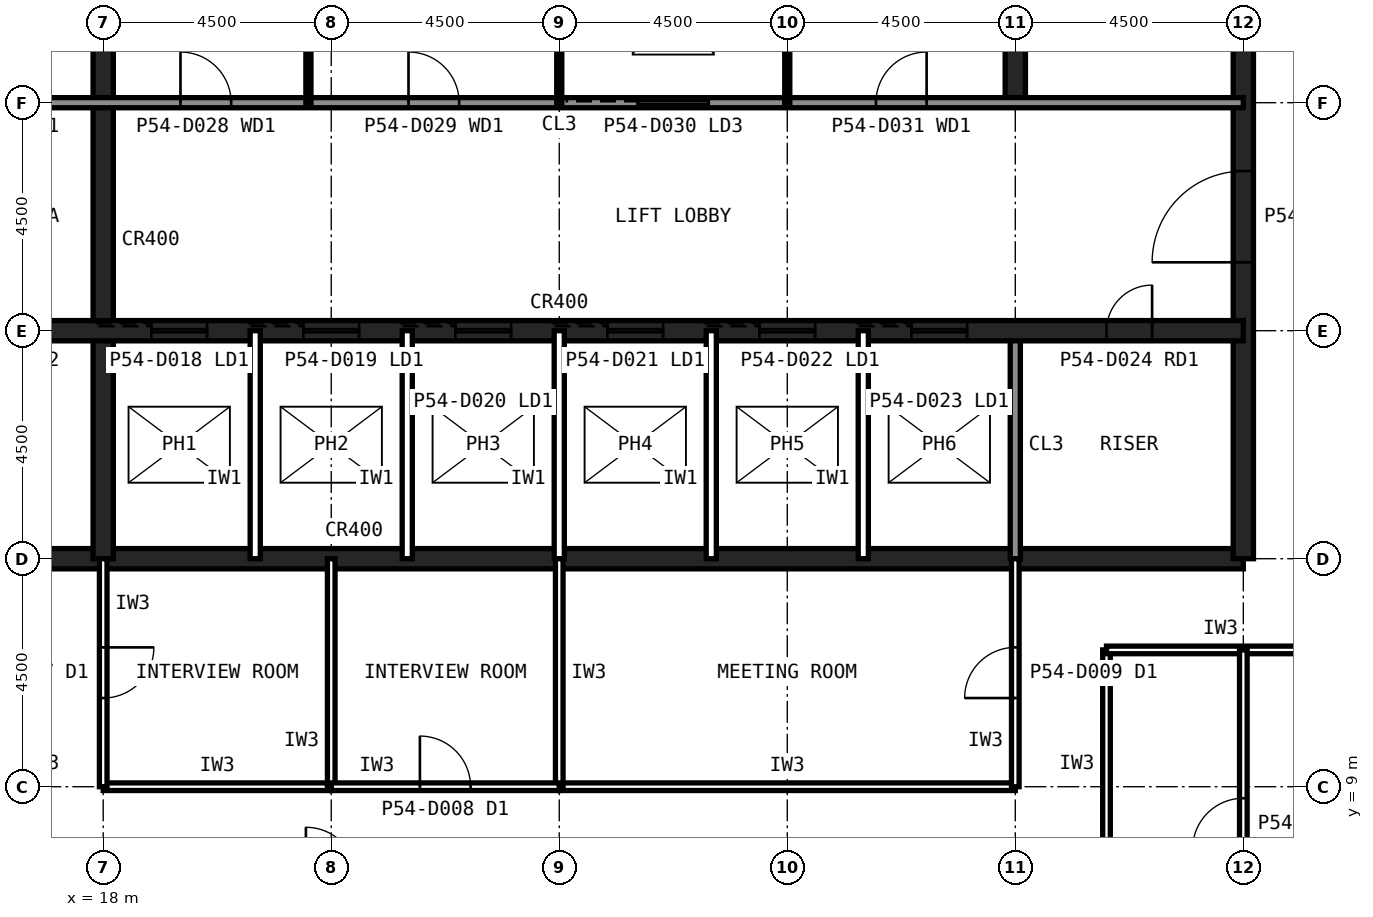
"""IFC4 building model, lengths in metres.
Left out: names, types, materials, properties, quantities, classifications, styles, units other than length and angle.
Written with IfcOpenShell. Run it as: python <this file> out.ifc"""

import sys

from ifc_helpers import new_model, si_unit, direction, frame, frame_2d, origin, place, context, subcontext, project, spatial, rectangle, extrude, element, fill, save


model = new_model("IFC4")
c1 = context("Model", 3, precision=1e-05, world=origin(), true_north=direction((0.0, 1.0)))
c2 = subcontext(c1, "Body", "Model", "MODEL_VIEW")
j1 = project(units=[si_unit("LENGTHUNIT", "METRE"), si_unit("PLANEANGLEUNIT", "RADIAN")], contexts=[c1])
p1 = place(None, origin())
s1 = spatial("IfcSite", under=j1, at=p1, CompositionType="ELEMENT")
p2 = place(p1, origin())
s2 = spatial("IfcBuilding", under=s1, at=p2, CompositionType="ELEMENT")
p3 = place(p2, frame((0.0, 0.0, 230.6)))
s3 = spatial("IfcBuildingStorey", under=s2, at=p3, CompositionType="ELEMENT", Elevation=230.6)
p4 = place(p3, frame((13.5, 13.5, 0.0), z_axis=(0.0, 0.0, 1.0), x_axis=(1.0, 0.0, 0.0)))
e1 = element("IfcWall", 1, at=p4, inside=s3, PredefinedType="SHEAR", context=c2, shape_type="SweptSolid", body=[
    extrude(rectangle(XDim=27.0, YDim=0.4, at=frame_2d((13.5, 0.0))), origin(), (0.0, 0.0, 1.0), 4.0),
])
p5 = place(p3, frame((40.5, 13.5, 0.0), z_axis=(0.0, 0.0, 1.0), x_axis=(0.0, 1.0, 0.0)))
e2 = element("IfcWall", 2, at=p5, inside=s3, PredefinedType="SHEAR", context=c2, shape_type="SweptSolid", body=[
    extrude(rectangle(XDim=27.0, YDim=0.4, at=frame_2d((13.5, 0.0))), origin(), (0.0, 0.0, 1.0), 4.0),
])
p6 = place(p5, frame((5.85, 0.0, 0.0)))
e3 = element("IfcOpeningElement", 3, at=p6, cuts=e2, PredefinedType="OPENING", context=c2, shape_type="SweptSolid", body=[
    extrude(rectangle(XDim=1.8, YDim=2.1, at=frame_2d((0.9, 1.05))), frame((0.0, 0.21, 0.0), z_axis=(0.0, -1.0, 0.0), x_axis=(1.0, 0.0, 0.0)), (0.0, 0.0, 1.0), 0.42),
])
p7 = place(p5, frame((19.65, 0.0, 0.0)))
e4 = element("IfcOpeningElement", 4, at=p7, cuts=e2, PredefinedType="OPENING", context=c2, shape_type="SweptSolid", body=[
    extrude(rectangle(XDim=1.2, YDim=2.1, at=frame_2d((0.6, 1.05))), frame((0.0, 0.21, 0.0), z_axis=(0.0, -1.0, 0.0), x_axis=(1.0, 0.0, 0.0)), (0.0, 0.0, 1.0), 0.42),
])
p8 = place(p3, frame((18.0, 13.5, 0.0), z_axis=(0.0, 0.0, 1.0), x_axis=(0.0, 1.0, 0.0)))
e5 = element("IfcWall", 5, at=p8, inside=s3, PredefinedType="SHEAR", context=c2, shape_type="SweptSolid", body=[
    extrude(rectangle(XDim=18.0, YDim=0.4, at=frame_2d((9.0, 0.0))), origin(), (0.0, 0.0, 1.0), 4.0),
])
p9 = place(p3, frame((36.0, 13.5, 0.0), z_axis=(0.0, 0.0, 1.0), x_axis=(0.0, 1.0, 0.0)))
e6 = element("IfcWall", 6, at=p9, inside=s3, PredefinedType="SOLIDWALL", context=c2, shape_type="SweptSolid", body=[
    extrude(rectangle(XDim=4.5, YDim=0.2, at=frame_2d((2.25, 0.0))), origin(), (0.0, 0.0, 1.0), 3.84),
])
p10 = place(p3, frame((36.0, 22.5, 0.0), z_axis=(0.0, 0.0, 1.0), x_axis=(0.0, 1.0, 0.0)))
e7 = element("IfcWall", 7, at=p10, inside=s3, PredefinedType="SHEAR", context=c2, shape_type="SweptSolid", body=[
    extrude(rectangle(XDim=18.0, YDim=0.4, at=frame_2d((9.0, 0.0))), origin(), (0.0, 0.0, 1.0), 4.0),
])
p11 = place(p3, frame((13.5, 18.0, 0.0), z_axis=(0.0, 0.0, 1.0), x_axis=(1.0, 0.0, 0.0)))
e8 = element("IfcWall", 8, at=p11, inside=s3, PredefinedType="SHEAR", context=c2, shape_type="SweptSolid", body=[
    extrude(rectangle(XDim=27.0, YDim=0.4, at=frame_2d((13.5, 0.0))), origin(), (0.0, 0.0, 1.0), 4.0),
])
p12 = place(p11, frame((24.3, 0.0, 0.0)))
e9 = element("IfcOpeningElement", 9, at=p12, cuts=e8, PredefinedType="OPENING", context=c2, shape_type="SweptSolid", body=[
    extrude(rectangle(XDim=0.9, YDim=2.1, at=frame_2d((0.45, 1.05))), frame((0.0, 0.21, 0.0), z_axis=(0.0, -1.0, 0.0), x_axis=(1.0, 0.0, 0.0)), (0.0, 0.0, 1.0), 0.42),
])
p13 = place(p11, frame((5.45, 0.0, 0.0)))
e10 = element("IfcOpeningElement", 10, at=p13, cuts=e8, PredefinedType="OPENING", context=c2, shape_type="SweptSolid", body=[
    extrude(rectangle(XDim=1.1, YDim=2.1, at=frame_2d((0.55, 1.05))), frame((0.0, 0.21, 0.0), z_axis=(0.0, -1.0, 0.0), x_axis=(1.0, 0.0, 0.0)), (0.0, 0.0, 1.0), 0.42),
])
p14 = place(p11, frame((8.45, 0.0, 0.0)))
e11 = element("IfcOpeningElement", 11, at=p14, cuts=e8, PredefinedType="OPENING", context=c2, shape_type="SweptSolid", body=[
    extrude(rectangle(XDim=1.1, YDim=2.1, at=frame_2d((0.55, 1.05))), frame((0.0, 0.21, 0.0), z_axis=(0.0, -1.0, 0.0), x_axis=(1.0, 0.0, 0.0)), (0.0, 0.0, 1.0), 0.42),
])
p15 = place(p11, frame((11.45, 0.0, 0.0)))
e12 = element("IfcOpeningElement", 12, at=p15, cuts=e8, PredefinedType="OPENING", context=c2, shape_type="SweptSolid", body=[
    extrude(rectangle(XDim=1.1, YDim=2.1, at=frame_2d((0.55, 1.05))), frame((0.0, 0.21, 0.0), z_axis=(0.0, -1.0, 0.0), x_axis=(1.0, 0.0, 0.0)), (0.0, 0.0, 1.0), 0.42),
])
p16 = place(p11, frame((14.45, 0.0, 0.0)))
e13 = element("IfcOpeningElement", 13, at=p16, cuts=e8, PredefinedType="OPENING", context=c2, shape_type="SweptSolid", body=[
    extrude(rectangle(XDim=1.1, YDim=2.1, at=frame_2d((0.55, 1.05))), frame((0.0, 0.21, 0.0), z_axis=(0.0, -1.0, 0.0), x_axis=(1.0, 0.0, 0.0)), (0.0, 0.0, 1.0), 0.42),
])
p17 = place(p11, frame((17.45, 0.0, 0.0)))
e14 = element("IfcOpeningElement", 14, at=p17, cuts=e8, PredefinedType="OPENING", context=c2, shape_type="SweptSolid", body=[
    extrude(rectangle(XDim=1.1, YDim=2.1, at=frame_2d((0.55, 1.05))), frame((0.0, 0.21, 0.0), z_axis=(0.0, -1.0, 0.0), x_axis=(1.0, 0.0, 0.0)), (0.0, 0.0, 1.0), 0.42),
])
p18 = place(p11, frame((20.45, 0.0, 0.0)))
e15 = element("IfcOpeningElement", 15, at=p18, cuts=e8, PredefinedType="OPENING", context=c2, shape_type="SweptSolid", body=[
    extrude(rectangle(XDim=1.1, YDim=2.1, at=frame_2d((0.55, 1.05))), frame((0.0, 0.21, 0.0), z_axis=(0.0, -1.0, 0.0), x_axis=(1.0, 0.0, 0.0)), (0.0, 0.0, 1.0), 0.42),
])
p19 = place(p11, frame((1.6, 0.0, 0.0)))
e16 = element("IfcOpeningElement", 16, at=p19, cuts=e8, PredefinedType="OPENING", context=c2, shape_type="SweptSolid", body=[
    extrude(rectangle(XDim=1.3, YDim=2.2, at=frame_2d((0.65, 1.1))), frame((0.0, 0.21, 0.0), z_axis=(0.0, -1.0, 0.0), x_axis=(1.0, 0.0, 0.0)), (0.0, 0.0, 1.0), 0.42),
])
p20 = place(p3, frame((13.5, 22.5, 0.0), z_axis=(0.0, 0.0, 1.0), x_axis=(1.0, 0.0, 0.0)))
e17 = element("IfcWall", 17, at=p20, inside=s3, PredefinedType="SOLIDWALL", context=c2, shape_type="SweptSolid", body=[
    extrude(rectangle(XDim=27.0, YDim=0.2, at=frame_2d((13.5, 0.0))), origin(), (0.0, 0.0, 1.0), 3.84),
])
p21 = place(p20, frame((1.65, 0.0, 0.0)))
e18 = element("IfcOpeningElement", 18, at=p21, cuts=e17, PredefinedType="OPENING", context=c2, shape_type="SweptSolid", body=[
    extrude(rectangle(XDim=1.2, YDim=2.1, at=frame_2d((0.6, 1.05))), frame((0.0, 0.11, 0.0), z_axis=(0.0, -1.0, 0.0), x_axis=(1.0, 0.0, 0.0)), (0.0, 0.0, 1.0), 0.22),
])
p22 = place(p20, frame((6.025, 0.0, 0.0)))
e19 = element("IfcOpeningElement", 19, at=p22, cuts=e17, PredefinedType="OPENING", context=c2, shape_type="SweptSolid", body=[
    extrude(rectangle(XDim=1.0, YDim=2.1, at=frame_2d((0.5, 1.05))), frame((0.0, 0.11, 0.0), z_axis=(0.0, -1.0, 0.0), x_axis=(1.0, 0.0, 0.0)), (0.0, 0.0, 1.0), 0.22),
])
p23 = place(p20, frame((10.525, 0.0, 0.0)))
e20 = element("IfcOpeningElement", 20, at=p23, cuts=e17, PredefinedType="OPENING", context=c2, shape_type="SweptSolid", body=[
    extrude(rectangle(XDim=1.0, YDim=2.1, at=frame_2d((0.5, 1.05))), frame((0.0, 0.11, 0.0), z_axis=(0.0, -1.0, 0.0), x_axis=(1.0, 0.0, 0.0)), (0.0, 0.0, 1.0), 0.22),
])
p24 = place(p20, frame((19.75, 0.0, 0.0)))
e21 = element("IfcOpeningElement", 21, at=p24, cuts=e17, PredefinedType="OPENING", context=c2, shape_type="SweptSolid", body=[
    extrude(rectangle(XDim=1.0, YDim=2.1, at=frame_2d((0.5, 1.05))), frame((0.0, 0.11, 0.0), z_axis=(0.0, -1.0, 0.0), x_axis=(1.0, 0.0, 0.0)), (0.0, 0.0, 1.0), 0.22),
])
p25 = place(p20, frame((15.05, 0.0, 0.0)))
e22 = element("IfcOpeningElement", 22, at=p25, cuts=e17, PredefinedType="OPENING", context=c2, shape_type="SweptSolid", body=[
    extrude(rectangle(XDim=1.4, YDim=2.4, at=frame_2d((0.7, 1.2))), frame((0.0, 0.11, 0.0), z_axis=(0.0, -1.0, 0.0), x_axis=(1.0, 0.0, 0.0)), (0.0, 0.0, 1.0), 0.22),
])
for number, where, z_axis, x_axis in (
    (23, (21.0, 13.5, 0.0), (0.0, 0.0, 1.0), (0.0, 1.0, 0.0)),
    (24, (24.0, 13.5, 0.0), (0.0, 0.0, 1.0), (0.0, 1.0, 0.0)),
    (25, (27.0, 13.5, 0.0), (0.0, 0.0, 1.0), (0.0, 1.0, 0.0)),
    (26, (30.0, 13.5, 0.0), (0.0, 0.0, 1.0), (0.0, 1.0, 0.0)),
    (27, (33.0, 13.5, 0.0), (0.0, 0.0, 1.0), (0.0, 1.0, 0.0)),
):
    element("IfcWall", number, at=place(p3, frame(where, z_axis=z_axis, x_axis=x_axis)), inside=s3, PredefinedType="PARTITIONING", context=c2, shape_type="SweptSolid", body=[
        extrude(rectangle(XDim=4.5, YDim=0.2, at=frame_2d((2.25, 0.0))), origin(), (0.0, 0.0, 1.0), 3.84),
    ])
for number, where, z_axis, x_axis in (
    (28, (22.05, 22.5, 0.0), (0.0, 0.0, 1.0), (0.0, 1.0, 0.0)),
    (29, (27.0, 22.5, 0.0), (0.0, 0.0, 1.0), (0.0, 1.0, 0.0)),
    (30, (31.5, 22.5, 0.0), (0.0, 0.0, 1.0), (0.0, 1.0, 0.0)),
):
    element("IfcWall", number, at=place(p3, frame(where, z_axis=z_axis, x_axis=x_axis)), inside=s3, PredefinedType="PLUMBINGWALL", context=c2, shape_type="SweptSolid", body=[
        extrude(rectangle(XDim=9.0, YDim=0.1, at=frame_2d((4.5, 0.0))), origin(), (0.0, 0.0, 1.0), 3.84),
    ])
for number, where, z_axis, x_axis in (
    (31, (37.8, 7.2, 0.0), (0.0, 0.0, 1.0), (0.0, 1.0, 0.0)),
    (32, (37.8, 11.7, 0.0), (0.0, 0.0, 1.0), (1.0, 0.0, 0.0)),
):
    element("IfcWall", number, at=place(p3, frame(where, z_axis=z_axis, x_axis=x_axis)), inside=s3, PredefinedType="PARTITIONING", context=c2, shape_type="SweptSolid", body=[
        extrude(rectangle(XDim=4.5, YDim=0.15, at=frame_2d((2.25, 0.0))), origin(), (0.0, 0.0, 1.0), 3.84),
    ])
p26 = place(p3, frame((27.0, 9.0, 0.0), z_axis=(0.0, 0.0, 1.0), x_axis=(1.0, 0.0, 0.0)))
e33 = element("IfcWall", 33, at=p26, inside=s3, PredefinedType="PARTITIONING", context=c2, shape_type="SweptSolid", body=[
    extrude(rectangle(XDim=9.0, YDim=0.15, at=frame_2d((4.5, 0.0))), origin(), (0.0, 0.0, 1.0), 3.84),
])
p27 = place(p3, frame((36.0, 9.0, 0.0), z_axis=(0.0, 0.0, 1.0), x_axis=(0.0, 1.0, 0.0)))
e34 = element("IfcWall", 34, at=p27, inside=s3, PredefinedType="PARTITIONING", context=c2, shape_type="SweptSolid", body=[
    extrude(rectangle(XDim=4.5, YDim=0.15, at=frame_2d((2.25, 0.0))), origin(), (0.0, 0.0, 1.0), 2.989),
])
p28 = place(p27, frame((1.75, 0.0, 0.0)))
e35 = element("IfcOpeningElement", 35, at=p28, cuts=e34, PredefinedType="OPENING", context=c2, shape_type="SweptSolid", body=[
    extrude(rectangle(XDim=1.0, YDim=2.1, at=frame_2d((0.5, 1.05))), frame((0.0, 0.085, 0.0), z_axis=(0.0, -1.0, 0.0), x_axis=(1.0, 0.0, 0.0)), (0.0, 0.0, 1.0), 0.17),
])
p29 = place(p3, frame((27.0, 13.5, 0.0), z_axis=(0.0, 0.0, 1.0), x_axis=(0.0, -1.0, 0.0)))
e36 = element("IfcWall", 36, at=p29, inside=s3, PredefinedType="PARTITIONING", context=c2, shape_type="SweptSolid", body=[
    extrude(rectangle(XDim=4.5, YDim=0.15, at=frame_2d((2.25, 0.0))), origin(), (0.0, 0.0, 1.0), 2.989),
])
p30 = place(p3, frame((18.0, 9.0, 0.0), z_axis=(0.0, 0.0, 1.0), x_axis=(1.0, 0.0, 0.0)))
e37 = element("IfcWall", 37, at=p30, inside=s3, PredefinedType="PARTITIONING", context=c2, shape_type="SweptSolid", body=[
    extrude(rectangle(XDim=4.5, YDim=0.15, at=frame_2d((2.25, 0.0))), origin(), (0.0, 0.0, 1.0), 3.84),
])
p31 = place(p3, frame((22.5, 9.0, 0.0), z_axis=(0.0, 0.0, 1.0), x_axis=(0.0, 1.0, 0.0)))
e38 = element("IfcWall", 38, at=p31, inside=s3, PredefinedType="PARTITIONING", context=c2, shape_type="SweptSolid", body=[
    extrude(rectangle(XDim=4.5, YDim=0.15, at=frame_2d((2.25, 0.0))), origin(), (0.0, 0.0, 1.0), 2.989),
])
p32 = place(p3, frame((18.0, 13.5, 0.0), z_axis=(0.0, 0.0, 1.0), x_axis=(0.0, -1.0, 0.0)))
e39 = element("IfcWall", 39, at=p32, inside=s3, PredefinedType="PARTITIONING", context=c2, shape_type="SweptSolid", body=[
    extrude(rectangle(XDim=4.5, YDim=0.15, at=frame_2d((2.25, 0.0))), origin(), (0.0, 0.0, 1.0), 2.989),
])
p33 = place(p32, frame((1.75, 0.0, 0.0)))
e40 = element("IfcOpeningElement", 40, at=p33, cuts=e39, PredefinedType="OPENING", context=c2, shape_type="SweptSolid", body=[
    extrude(rectangle(XDim=1.0, YDim=2.1, at=frame_2d((0.5, 1.05))), frame((0.0, 0.085, 0.0), z_axis=(0.0, -1.0, 0.0), x_axis=(1.0, 0.0, 0.0)), (0.0, 0.0, 1.0), 0.17),
])
p34 = place(p3, frame((22.5, 9.0, 0.0), z_axis=(0.0, 0.0, 1.0), x_axis=(1.0, 0.0, 0.0)))
e41 = element("IfcWall", 41, at=p34, inside=s3, PredefinedType="PARTITIONING", context=c2, shape_type="SweptSolid", body=[
    extrude(rectangle(XDim=4.5, YDim=0.15, at=frame_2d((2.25, 0.0))), origin(), (0.0, 0.0, 1.0), 3.84),
])
p35 = place(p34, frame((1.75, 0.0, 0.0)))
e42 = element("IfcOpeningElement", 42, at=p35, cuts=e41, PredefinedType="OPENING", context=c2, shape_type="SweptSolid", body=[
    extrude(rectangle(XDim=1.0, YDim=2.1, at=frame_2d((0.5, 1.05))), frame((0.0, 0.085, 0.0), z_axis=(0.0, -1.0, 0.0), x_axis=(1.0, 0.0, 0.0)), (0.0, 0.0, 1.0), 0.17),
])
p36 = place(p3, frame((40.5, 4.845, 0.0), z_axis=(0.0, 0.0, 1.0), x_axis=(0.0, 1.0, 0.0)))
e43 = element("IfcWall", 43, at=p36, inside=s3, PredefinedType="PARTITIONING", context=c2, shape_type="SweptSolid", body=[
    extrude(rectangle(XDim=6.855, YDim=0.15, at=frame_2d((3.427, 0.0))), origin(), (0.0, 0.0, 1.0), 2.989),
])
p37 = place(p36, frame((2.927, 0.0, 0.0)))
e44 = element("IfcOpeningElement", 44, at=p37, cuts=e43, PredefinedType="OPENING", context=c2, shape_type="SweptSolid", body=[
    extrude(rectangle(XDim=1.0, YDim=2.1, at=frame_2d((0.5, 1.05))), frame((0.0, 0.085, 0.0), z_axis=(0.0, -1.0, 0.0), x_axis=(1.0, 0.0, 0.0)), (0.0, 0.0, 1.0), 0.17),
])
p38 = place(p6, origin())
e45 = element("IfcDoor", 45, at=p38, inside=s3, OperationType="SINGLE_SWING_LEFT", PredefinedType="DOOR", context=c2, shape_type="SweptSolid", body=[
    extrude(rectangle(XDim=1.8, YDim=2.1, at=frame_2d((0.9, 1.05))), frame((0.0, 0.025, 0.0), z_axis=(0.0, -1.0, 0.0), x_axis=(1.0, 0.0, 0.0)), (0.0, 0.0, 1.0), 0.05),
])
fill(e3, e45)
p39 = place(p22, origin())
e46 = element("IfcDoor", 46, at=p39, inside=s3, OperationType="SINGLE_SWING_LEFT", PredefinedType="DOOR", context=c2, shape_type="SweptSolid", body=[
    extrude(rectangle(XDim=1.0, YDim=2.1, at=frame_2d((0.5, 1.05))), frame((0.0, 0.025, 0.0), z_axis=(0.0, -1.0, 0.0), x_axis=(1.0, 0.0, 0.0)), (0.0, 0.0, 1.0), 0.05),
])
fill(e19, e46)
p40 = place(p23, origin())
e47 = element("IfcDoor", 47, at=p40, inside=s3, OperationType="SINGLE_SWING_LEFT", PredefinedType="DOOR", context=c2, shape_type="SweptSolid", body=[
    extrude(rectangle(XDim=1.0, YDim=2.1, at=frame_2d((0.5, 1.05))), frame((0.0, 0.025, 0.0), z_axis=(0.0, -1.0, 0.0), x_axis=(1.0, 0.0, 0.0)), (0.0, 0.0, 1.0), 0.05),
])
fill(e20, e47)
p41 = place(p24, origin())
e48 = element("IfcDoor", 48, at=p41, inside=s3, OperationType="SINGLE_SWING_RIGHT", PredefinedType="DOOR", context=c2, shape_type="SweptSolid", body=[
    extrude(rectangle(XDim=1.0, YDim=2.1, at=frame_2d((0.5, 1.05))), frame((0.0, 0.025, 0.0), z_axis=(0.0, -1.0, 0.0), x_axis=(1.0, 0.0, 0.0)), (0.0, 0.0, 1.0), 0.05),
])
fill(e21, e48)
p42 = place(p12, origin())
e49 = element("IfcDoor", 49, at=p42, inside=s3, OperationType="SINGLE_SWING_RIGHT", PredefinedType="DOOR", context=c2, shape_type="SweptSolid", body=[
    extrude(rectangle(XDim=0.9, YDim=2.1, at=frame_2d((0.45, 1.05))), frame((0.0, 0.025, 0.0), z_axis=(0.0, -1.0, 0.0), x_axis=(1.0, 0.0, 0.0)), (0.0, 0.0, 1.0), 0.05),
])
fill(e9, e49)
p43 = place(p13, origin())
e50 = element("IfcDoor", 50, at=p43, inside=s3, OperationType="SLIDING_TO_LEFT", PredefinedType="DOOR", context=c2, shape_type="SweptSolid", body=[
    extrude(rectangle(XDim=1.1, YDim=2.1, at=frame_2d((0.55, 1.05))), frame((0.0, 0.025, 0.0), z_axis=(0.0, -1.0, 0.0), x_axis=(1.0, 0.0, 0.0)), (0.0, 0.0, 1.0), 0.05),
])
fill(e10, e50)
p44 = place(p14, origin())
e51 = element("IfcDoor", 51, at=p44, inside=s3, OperationType="SLIDING_TO_LEFT", PredefinedType="DOOR", context=c2, shape_type="SweptSolid", body=[
    extrude(rectangle(XDim=1.1, YDim=2.1, at=frame_2d((0.55, 1.05))), frame((0.0, 0.025, 0.0), z_axis=(0.0, -1.0, 0.0), x_axis=(1.0, 0.0, 0.0)), (0.0, 0.0, 1.0), 0.05),
])
fill(e11, e51)
p45 = place(p15, origin())
e52 = element("IfcDoor", 52, at=p45, inside=s3, OperationType="SLIDING_TO_LEFT", PredefinedType="DOOR", context=c2, shape_type="SweptSolid", body=[
    extrude(rectangle(XDim=1.1, YDim=2.1, at=frame_2d((0.55, 1.05))), frame((0.0, 0.025, 0.0), z_axis=(0.0, -1.0, 0.0), x_axis=(1.0, 0.0, 0.0)), (0.0, 0.0, 1.0), 0.05),
])
fill(e12, e52)
p46 = place(p16, origin())
e53 = element("IfcDoor", 53, at=p46, inside=s3, OperationType="SLIDING_TO_LEFT", PredefinedType="DOOR", context=c2, shape_type="SweptSolid", body=[
    extrude(rectangle(XDim=1.1, YDim=2.1, at=frame_2d((0.55, 1.05))), frame((0.0, 0.025, 0.0), z_axis=(0.0, -1.0, 0.0), x_axis=(1.0, 0.0, 0.0)), (0.0, 0.0, 1.0), 0.05),
])
fill(e13, e53)
p47 = place(p17, origin())
e54 = element("IfcDoor", 54, at=p47, inside=s3, OperationType="SLIDING_TO_LEFT", PredefinedType="DOOR", context=c2, shape_type="SweptSolid", body=[
    extrude(rectangle(XDim=1.1, YDim=2.1, at=frame_2d((0.55, 1.05))), frame((0.0, 0.025, 0.0), z_axis=(0.0, -1.0, 0.0), x_axis=(1.0, 0.0, 0.0)), (0.0, 0.0, 1.0), 0.05),
])
fill(e14, e54)
p48 = place(p18, origin())
e55 = element("IfcDoor", 55, at=p48, inside=s3, OperationType="SLIDING_TO_LEFT", PredefinedType="DOOR", context=c2, shape_type="SweptSolid", body=[
    extrude(rectangle(XDim=1.1, YDim=2.1, at=frame_2d((0.55, 1.05))), frame((0.0, 0.025, 0.0), z_axis=(0.0, -1.0, 0.0), x_axis=(1.0, 0.0, 0.0)), (0.0, 0.0, 1.0), 0.05),
])
fill(e15, e55)
p49 = place(p25, origin())
e56 = element("IfcDoor", 56, at=p49, inside=s3, OperationType="SLIDING_TO_LEFT", PredefinedType="DOOR", context=c2, shape_type="SweptSolid", body=[
    extrude(rectangle(XDim=1.4, YDim=2.4, at=frame_2d((0.7, 1.2))), frame((0.0, 0.025, 0.0), z_axis=(0.0, -1.0, 0.0), x_axis=(1.0, 0.0, 0.0)), (0.0, 0.0, 1.0), 0.05),
])
fill(e22, e56)
p50 = place(p28, origin())
e57 = element("IfcDoor", 57, at=p50, inside=s3, OperationType="SINGLE_SWING_LEFT", PredefinedType="DOOR", context=c2, shape_type="SweptSolid", body=[
    extrude(rectangle(XDim=1.0, YDim=2.1, at=frame_2d((0.5, 1.05))), frame((0.0, 0.025, 0.0), z_axis=(0.0, -1.0, 0.0), x_axis=(1.0, 0.0, 0.0)), (0.0, 0.0, 1.0), 0.05),
])
fill(e35, e57)
p51 = place(p33, origin())
e58 = element("IfcDoor", 58, at=p51, inside=s3, OperationType="SINGLE_SWING_LEFT", PredefinedType="DOOR", context=c2, shape_type="SweptSolid", body=[
    extrude(rectangle(XDim=1.0, YDim=2.1, at=frame_2d((0.5, 1.05))), frame((0.0, 0.025, 0.0), z_axis=(0.0, -1.0, 0.0), x_axis=(1.0, 0.0, 0.0)), (0.0, 0.0, 1.0), 0.05),
])
fill(e40, e58)
p52 = place(p35, origin())
e59 = element("IfcDoor", 59, at=p52, inside=s3, OperationType="SINGLE_SWING_LEFT", PredefinedType="DOOR", context=c2, shape_type="SweptSolid", body=[
    extrude(rectangle(XDim=1.0, YDim=2.1, at=frame_2d((0.5, 1.05))), frame((0.0, 0.025, 0.0), z_axis=(0.0, -1.0, 0.0), x_axis=(1.0, 0.0, 0.0)), (0.0, 0.0, 1.0), 0.05),
])
fill(e42, e59)
p53 = place(p37, origin())
e60 = element("IfcDoor", 60, at=p53, inside=s3, OperationType="SINGLE_SWING_LEFT", PredefinedType="DOOR", context=c2, shape_type="SweptSolid", body=[
    extrude(rectangle(XDim=1.0, YDim=2.1, at=frame_2d((0.5, 1.05))), frame((0.0, 0.025, 0.0), z_axis=(0.0, -1.0, 0.0), x_axis=(1.0, 0.0, 0.0)), (0.0, 0.0, 1.0), 0.05),
])
fill(e44, e60)
save(model, sys.argv[1])
